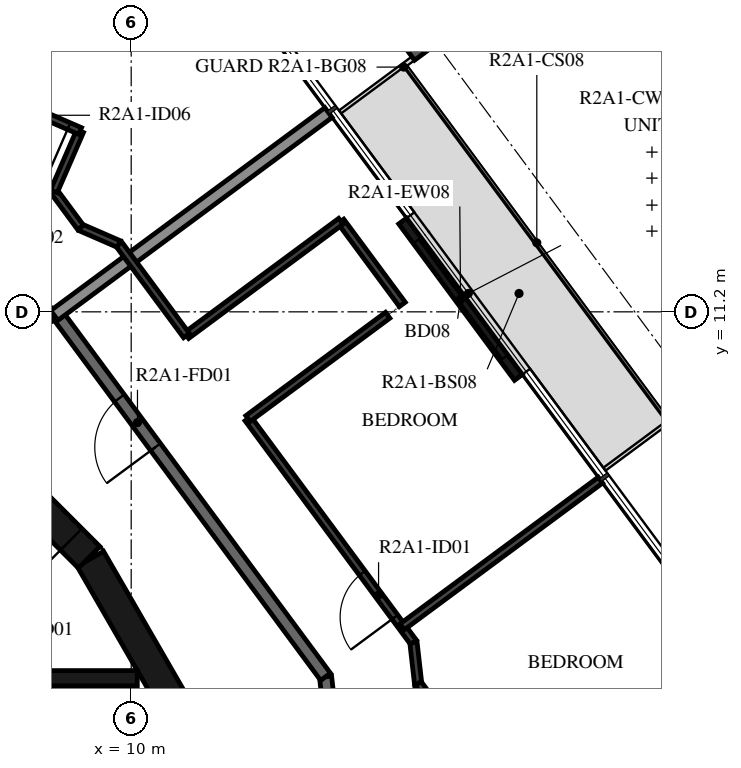
"""IFC4 building model, lengths in metres.
Left out: names, types, materials, properties, quantities, classifications, styles, units other than length and angle.
Written with IfcOpenShell. Run it as: python <this file> out.ifc"""

import sys

from ifc_helpers import new_model, si_unit, direction, frame, frame_2d, origin, origin_2d, place, context, subcontext, project, spatial, polyline, rectangle, i_section, outline, extrude, element, fill, save


model = new_model("IFC4")
c1 = context("Model", 3, precision=1e-05, world=origin(), true_north=direction((0.0, 1.0)))
c2 = subcontext(c1, "Body", "Model", "MODEL_VIEW")
j1 = project(units=[si_unit("LENGTHUNIT", "METRE"), si_unit("PLANEANGLEUNIT", "RADIAN")], contexts=[c1])
p1 = place(None, origin())
s1 = spatial("IfcSite", under=j1, at=p1, CompositionType="ELEMENT")
p2 = place(p1, origin())
s2 = spatial("IfcBuilding", under=s1, at=p2, CompositionType="ELEMENT")
p3 = place(p2, frame((0.0, 0.0, 80.2)))
s3 = spatial("IfcBuildingStorey", under=s2, at=p3, CompositionType="ELEMENT", Elevation=80.2)
p4 = place(p3, frame((14.932, 15.726, -0.38), z_axis=(0.0, 0.0, 1.0), x_axis=(0.594822857897, -0.803856807972, 0.0)))
e1 = element("IfcColumn", 1, at=p4, inside=s3, PredefinedType="COLUMN", context=c2, shape_type="SweptSolid", body=[
    extrude(i_section(OverallWidth=0.3, OverallDepth=0.9, WebThickness=0.019, FlangeThickness=0.035, FilletRadius=0.03, at=origin_2d()), origin(), (0.0, 0.0, 1.0), 3.5),
])
p5 = place(p3, frame((16.368, 10.121, 0.0), z_axis=(0.0, 0.0, 1.0), x_axis=(-0.594811452818, 0.803865247163, 0.0)))
e2 = element("IfcWall", 2, at=p5, inside=s3, PredefinedType="STANDARD", context=c2, shape_type="SweptSolid", body=[
    extrude(rectangle(XDim=3.2, YDim=0.16, at=frame_2d((1.6, 0.0))), origin(), (0.0, 0.0, 1.0), 3.12),
])
p6 = place(p5, frame((0.4, 0.0, 0.0)))
e3 = element("IfcOpeningElement", 3, at=p6, cuts=e2, PredefinedType="OPENING", context=c2, shape_type="SweptSolid", body=[
    extrude(rectangle(XDim=2.4, YDim=2.4, at=frame_2d((1.2, 1.2))), frame((0.0, 0.09, 0.0), z_axis=(0.0, -1.0, 0.0), x_axis=(1.0, 0.0, 0.0)), (0.0, 0.0, 1.0), 0.18),
])
p7 = place(p3, frame((10.845, 4.51, 0.0), z_axis=(0.0, 0.0, 1.0), x_axis=(-0.500087131594, 0.865975092491, 0.0)))
e4 = element("IfcWall", 4, at=p7, inside=s3, PredefinedType="SHEAR", context=c2, shape_type="SweptSolid", body=[
    extrude(rectangle(XDim=3.033, YDim=0.5, at=frame_2d((1.516, 0.0))), origin(), (0.0, 0.0, 1.0), 3.12),
])
p8 = place(p3, frame((9.308, 7.164, 0.0), z_axis=(0.0, 0.0, 1.0), x_axis=(-0.707106781187, 0.707106781187, 0.0)))
e5 = element("IfcWall", 5, at=p8, inside=s3, PredefinedType="SHEAR", context=c2, shape_type="SweptSolid", body=[
    extrude(rectangle(XDim=3.032, YDim=0.5, at=frame_2d((1.516, 0.0))), origin(), (0.0, 0.0, 1.0), 3.12),
])
p9 = place(p8, frame((0.416, 0.0, 0.0)))
e6 = element("IfcOpeningElement", 6, at=p9, cuts=e5, PredefinedType="OPENING", context=c2, shape_type="SweptSolid", body=[
    extrude(rectangle(XDim=1.2, YDim=2.1, at=frame_2d((0.6, 1.05))), frame((0.0, 0.26, 0.0), z_axis=(0.0, -1.0, 0.0), x_axis=(1.0, 0.0, 0.0)), (0.0, 0.0, 1.0), 0.52),
])
p10 = place(p3, frame((7.0, 5.175, 0.0), z_axis=(0.0, 0.0, 1.0), x_axis=(1.0, 0.0, 0.0)))
e7 = element("IfcWall", 7, at=p10, inside=s3, PredefinedType="SHEAR", context=c2, shape_type="SweptSolid", body=[
    extrude(rectangle(XDim=3.1, YDim=0.25, at=frame_2d((1.55, 0.0))), origin(), (0.0, 0.0, 1.0), 3.12),
])
p11 = place(p3, origin())
e8 = element("IfcWall", 8, at=p11, inside=s3, PredefinedType="SHEAR", context=c2, shape_type="SweptSolid", body=[
    extrude(outline(polyline([(-9.55, 4.8), (-7.65, 4.8), (-7.65, 1.9), (-7.4, 1.9), (-7.4, 4.8), (-5.5, 4.8), (-5.5, 1.9), (-5.25, 1.9), (-5.25, 4.8), (-3.35, 4.8), (-3.35, 1.9), (-3.1, 1.9), (-3.1, 4.8), (-1.2, 4.8), (-1.2, 1.9), (-0.95, 1.9), (-0.95, 4.8), (3.1, 4.8), (3.1, 1.9), (3.35, 1.9), (3.35, 4.8), (5.25, 4.8), (5.25, 1.9), (5.5, 1.9), (5.5, 4.8), (7.4, 4.8), (7.4, 1.9), (7.65, 1.9), (7.65, 4.8), (9.55, 4.8), (9.55, 1.9), (9.8, 1.9), (9.8, 4.8), (9.8, 5.05), (-9.8, 5.05), (-9.8, 4.8), (-9.8, 1.9), (-9.55, 1.9), (-9.55, 4.8)])), origin(), (0.0, 0.0, 1.0), 3.12),
])
p12 = place(p3, frame((14.028, -2.096, 0.0), z_axis=(0.0, 0.0, 1.0), x_axis=(-0.113226782163, 0.993569170114, 0.0)))
e9 = element("IfcWall", 9, at=p12, inside=s3, PredefinedType="STANDARD", context=c2, shape_type="SweptSolid", body=[
    extrude(rectangle(XDim=7.342, YDim=0.2, at=frame_2d((3.671, 0.0))), origin(), (0.0, 0.0, 1.0), 3.12),
])
p13 = place(p3, frame((13.196, 5.198, 0.0), z_axis=(0.0, 0.0, 1.0), x_axis=(-0.594805187394, 0.803869883159, 0.0)))
e10 = element("IfcWall", 10, at=p13, inside=s3, PredefinedType="STANDARD", context=c2, shape_type="SweptSolid", body=[
    extrude(rectangle(XDim=7.342, YDim=0.2, at=frame_2d((3.671, 0.0))), origin(), (0.0, 0.0, 1.0), 3.12),
])
p14 = place(p13, frame((4.7, 0.0, 0.0)))
e11 = element("IfcOpeningElement", 11, at=p14, cuts=e10, PredefinedType="OPENING", context=c2, shape_type="SweptSolid", body=[
    extrude(rectangle(XDim=1.0, YDim=2.1, at=frame_2d((0.5, 1.05))), frame((0.0, 0.11, 0.0), z_axis=(0.0, -1.0, 0.0), x_axis=(1.0, 0.0, 0.0)), (0.0, 0.0, 1.0), 0.22),
])
p15 = place(p3, frame((8.736, 11.141, 0.0), z_axis=(0.0, 0.0, 1.0), x_axis=(-0.917051290697, 0.398769269416, 0.0)))
e12 = element("IfcWall", 12, at=p15, inside=s3, PredefinedType="STANDARD", context=c2, shape_type="SweptSolid", body=[
    extrude(rectangle(XDim=7.24, YDim=0.2, at=frame_2d((3.62, 0.0))), origin(), (0.0, 0.0, 1.0), 3.12),
])
p16 = place(p15, frame((0.2, 0.0, 0.0)))
e13 = element("IfcOpeningElement", 13, at=p16, cuts=e12, PredefinedType="OPENING", context=c2, shape_type="SweptSolid", body=[
    extrude(rectangle(XDim=1.0, YDim=2.1, at=frame_2d((0.5, 1.05))), frame((0.0, 0.11, 0.0), z_axis=(0.0, -1.0, 0.0), x_axis=(1.0, 0.0, 0.0)), (0.0, 0.0, 1.0), 0.22),
])
p17 = place(p3, frame((13.244, 14.477, 0.0), z_axis=(0.0, 0.0, 1.0), x_axis=(-0.803853971109, -0.594826691677, 0.0)))
e14 = element("IfcWall", 14, at=p17, inside=s3, PredefinedType="STANDARD", context=c2, shape_type="SweptSolid", body=[
    extrude(rectangle(XDim=5.609, YDim=0.2, at=frame_2d((2.804, 0.0))), origin(), (0.0, 0.0, 1.0), 2.73),
])
p18 = place(p3, frame((15.563, -2.326, 0.0), z_axis=(0.0, 0.0, 1.0), x_axis=(-0.11320423706, 0.993571739087, 0.0)))
e15 = element("IfcWall", 15, at=p18, inside=s3, PredefinedType="PARTITIONING", context=c2, shape_type="SweptSolid", body=[
    extrude(rectangle(XDim=8.146, YDim=0.12, at=frame_2d((4.073, 0.0))), origin(), (0.0, 0.0, 1.0), 3.12),
])
p19 = place(p18, frame((1.592, 0.0, 0.0)))
e16 = element("IfcOpeningElement", 16, at=p19, cuts=e15, PredefinedType="OPENING", context=c2, shape_type="SweptSolid", body=[
    extrude(rectangle(XDim=0.8, YDim=2.1, at=frame_2d((0.4, 1.05))), frame((0.0, 0.07, 0.0), z_axis=(0.0, -1.0, 0.0), x_axis=(1.0, 0.0, 0.0)), (0.0, 0.0, 1.0), 0.14),
])
p20 = place(p3, frame((14.641, 5.767, 0.0), z_axis=(0.0, 0.0, 1.0), x_axis=(-0.594785744505, 0.803884269117, 0.0)))
e17 = element("IfcWall", 17, at=p20, inside=s3, PredefinedType="PARTITIONING", context=c2, shape_type="SweptSolid", body=[
    extrude(rectangle(XDim=4.573, YDim=0.12, at=frame_2d((2.287, 0.0))), origin(), (0.0, 0.0, 1.0), 3.12),
])
p21 = place(p20, frame((0.513, 0.0, 0.0)))
e18 = element("IfcOpeningElement", 18, at=p21, cuts=e17, PredefinedType="OPENING", context=c2, shape_type="SweptSolid", body=[
    extrude(rectangle(XDim=0.9, YDim=2.1, at=frame_2d((0.45, 1.05))), frame((0.0, 0.07, 0.0), z_axis=(0.0, -1.0, 0.0), x_axis=(1.0, 0.0, 0.0)), (0.0, 0.0, 1.0), 0.14),
])
p22 = place(p3, frame((11.921, 9.444, 0.0), z_axis=(0.0, 0.0, 1.0), x_axis=(0.803838630796, 0.594847422151, 0.0)))
e19 = element("IfcWall", 19, at=p22, inside=s3, PredefinedType="PARTITIONING", context=c2, shape_type="SweptSolid", body=[
    extrude(rectangle(XDim=2.857, YDim=0.12, at=frame_2d((1.429, 0.0))), origin(), (0.0, 0.0, 1.0), 3.12),
])
p23 = place(p3, frame((14.459, 11.322, 0.0), z_axis=(0.0, 0.0, 1.0), x_axis=(-0.594863421241, 0.803826791087, 0.0)))
e20 = element("IfcWall", 20, at=p23, inside=s3, PredefinedType="PARTITIONING", context=c2, shape_type="SweptSolid", body=[
    extrude(rectangle(XDim=1.7, YDim=0.12, at=frame_2d((0.85, 0.0))), origin(), (0.0, 0.0, 1.0), 3.12),
])
p24 = place(p3, frame((13.448, 12.688, 0.0), z_axis=(0.0, 0.0, 1.0), x_axis=(-0.803843378098, -0.594841006898, 0.0)))
e21 = element("IfcWall", 21, at=p24, inside=s3, PredefinedType="PARTITIONING", context=c2, shape_type="SweptSolid", body=[
    extrude(rectangle(XDim=3.157, YDim=0.12, at=frame_2d((1.579, 0.0))), origin(), (0.0, 0.0, 1.0), 3.12),
])
p25 = place(p3, frame((10.91, 10.81, 0.0), z_axis=(0.0, 0.0, 1.0), x_axis=(-0.59489693125, 0.803801991282, 0.0)))
e22 = element("IfcWall", 22, at=p25, inside=s3, PredefinedType="PARTITIONING", context=c2, shape_type="SweptSolid", body=[
    extrude(rectangle(XDim=1.872, YDim=0.12, at=frame_2d((0.936, 0.0))), origin(), (0.0, 0.0, 1.0), 3.12),
])
p26 = place(p3, frame((21.201, -3.674, 0.0), z_axis=(0.0, 0.0, 1.0), x_axis=(-0.594822450109, 0.803857109719, 0.0)))
e23 = element("IfcWall", 23, at=p26, inside=s3, PredefinedType="PARTITIONING", context=c2, shape_type="SweptSolid", body=[
    extrude(rectangle(XDim=10.898, YDim=0.12, at=frame_2d((5.449, 0.0))), origin(), (0.0, 0.0, 1.0), 3.12),
])
p27 = place(p26, frame((0.2, 0.0, 0.0)))
e24 = element("IfcOpeningElement", 24, at=p27, cuts=e23, PredefinedType="OPENING", context=c2, shape_type="SweptSolid", body=[
    extrude(rectangle(XDim=0.9, YDim=2.1, at=frame_2d((0.45, 1.05))), frame((0.0, 0.07, 0.0), z_axis=(0.0, -1.0, 0.0), x_axis=(1.0, 0.0, 0.0)), (0.0, 0.0, 1.0), 0.14),
])
p28 = place(p3, frame((17.717, 8.433, 0.0), z_axis=(0.0, 0.0, 1.0), x_axis=(-0.803853407146, -0.594827453821, 0.0)))
e25 = element("IfcWall", 25, at=p28, inside=s3, PredefinedType="PARTITIONING", context=c2, shape_type="SweptSolid", body=[
    extrude(rectangle(XDim=4.058, YDim=0.12, at=frame_2d((2.029, 0.0))), origin(), (0.0, 0.0, 1.0), 2.73),
])
p29 = place(p3, frame((9.796, 12.315, 0.0), z_axis=(0.0, 0.0, 1.0), x_axis=(-0.916973672273, 0.398947721335, 0.0)))
e26 = element("IfcWall", 26, at=p29, inside=s3, PredefinedType="PARTITIONING", context=c2, shape_type="SweptSolid", body=[
    extrude(rectangle(XDim=0.685, YDim=0.12, at=frame_2d((0.342, 0.0))), origin(), (0.0, 0.0, 1.0), 3.12),
])
p30 = place(p3, frame((9.168, 12.588, 0.0), z_axis=(0.0, 0.0, 1.0), x_axis=(-0.595069416139, 0.803674305908, 0.0)))
e27 = element("IfcWall", 27, at=p30, inside=s3, PredefinedType="PARTITIONING", context=c2, shape_type="SweptSolid", body=[
    extrude(rectangle(XDim=0.739, YDim=0.12, at=frame_2d((0.369, 0.0))), origin(), (0.0, 0.0, 1.0), 3.12),
])
p31 = place(p3, frame((8.729, 13.182, 0.0), z_axis=(0.0, 0.0, 1.0), x_axis=(0.398792168027, 0.917041333158, 0.0)))
e28 = element("IfcWall", 28, at=p31, inside=s3, PredefinedType="PARTITIONING", context=c2, shape_type="SweptSolid", body=[
    extrude(rectangle(XDim=1.081, YDim=0.12, at=frame_2d((0.541, 0.0))), origin(), (0.0, 0.0, 1.0), 3.12),
])
p32 = place(p3, frame((9.16, 14.173, 0.0), z_axis=(0.0, 0.0, 1.0), x_axis=(-0.917044941137, 0.398783871208, 0.0)))
e29 = element("IfcWall", 29, at=p32, inside=s3, PredefinedType="PARTITIONING", context=c2, shape_type="SweptSolid", body=[
    extrude(rectangle(XDim=1.7, YDim=0.12, at=frame_2d((0.85, 0.0))), origin(), (0.0, 0.0, 1.0), 3.12),
])
p33 = place(p32, frame((0.2, 0.0, 0.0)))
e30 = element("IfcOpeningElement", 30, at=p33, cuts=e29, PredefinedType="OPENING", context=c2, shape_type="SweptSolid", body=[
    extrude(rectangle(XDim=0.9, YDim=2.1, at=frame_2d((0.45, 1.05))), frame((0.0, 0.07, 0.0), z_axis=(0.0, -1.0, 0.0), x_axis=(1.0, 0.0, 0.0)), (0.0, 0.0, 1.0), 0.14),
])
p34 = place(p3, frame((8.772, 20.521, 0.0), z_axis=(0.0, 0.0, 1.0), x_axis=(-0.202291839423, -0.979325283909, 0.0)))
e31 = element("IfcWall", 31, at=p34, inside=s3, PredefinedType="PARTITIONING", context=c2, shape_type="SweptSolid", body=[
    extrude(rectangle(XDim=5.789, YDim=0.12, at=frame_2d((2.895, 0.0))), origin(), (0.0, 0.0, 1.0), 3.12),
])
p35 = place(p6, origin())
e32 = element("IfcDoor", 32, at=p35, inside=s3, OperationType="DOUBLE_DOOR_SLIDING", PredefinedType="DOOR", context=c2, shape_type="SweptSolid", body=[
    extrude(rectangle(XDim=2.4, YDim=2.4, at=frame_2d((1.2, 1.2))), frame((0.0, 0.025, 0.0), z_axis=(0.0, -1.0, 0.0), x_axis=(1.0, 0.0, 0.0)), (0.0, 0.0, 1.0), 0.05),
])
fill(e3, e32)
p36 = place(p9, origin())
e33 = element("IfcDoor", 33, at=p36, inside=s3, OperationType="SINGLE_SWING_RIGHT", PredefinedType="DOOR", context=c2, shape_type="SweptSolid", body=[
    extrude(rectangle(XDim=1.2, YDim=2.1, at=frame_2d((0.6, 1.05))), frame((0.0, 0.025, 0.0), z_axis=(0.0, -1.0, 0.0), x_axis=(1.0, 0.0, 0.0)), (0.0, 0.0, 1.0), 0.05),
])
fill(e6, e33)
p37 = place(p14, origin())
e34 = element("IfcDoor", 34, at=p37, inside=s3, OperationType="SINGLE_SWING_RIGHT", PredefinedType="DOOR", context=c2, shape_type="SweptSolid", body=[
    extrude(rectangle(XDim=1.0, YDim=2.1, at=frame_2d((0.5, 1.05))), frame((0.0, 0.025, 0.0), z_axis=(0.0, -1.0, 0.0), x_axis=(1.0, 0.0, 0.0)), (0.0, 0.0, 1.0), 0.05),
])
fill(e11, e34)
p38 = place(p21, origin())
e35 = element("IfcDoor", 35, at=p38, inside=s3, OperationType="SINGLE_SWING_LEFT", PredefinedType="DOOR", context=c2, shape_type="SweptSolid", body=[
    extrude(rectangle(XDim=0.9, YDim=2.1, at=frame_2d((0.45, 1.05))), frame((0.0, 0.025, 0.0), z_axis=(0.0, -1.0, 0.0), x_axis=(1.0, 0.0, 0.0)), (0.0, 0.0, 1.0), 0.05),
])
fill(e18, e35)
p39 = place(p33, origin())
e36 = element("IfcDoor", 36, at=p39, inside=s3, OperationType="SINGLE_SWING_RIGHT", PredefinedType="DOOR", context=c2, shape_type="SweptSolid", body=[
    extrude(rectangle(XDim=0.9, YDim=2.1, at=frame_2d((0.45, 1.05))), frame((0.0, 0.025, 0.0), z_axis=(0.0, -1.0, 0.0), x_axis=(1.0, 0.0, 0.0)), (0.0, 0.0, 1.0), 0.05),
])
fill(e30, e36)
save(model, sys.argv[1])
